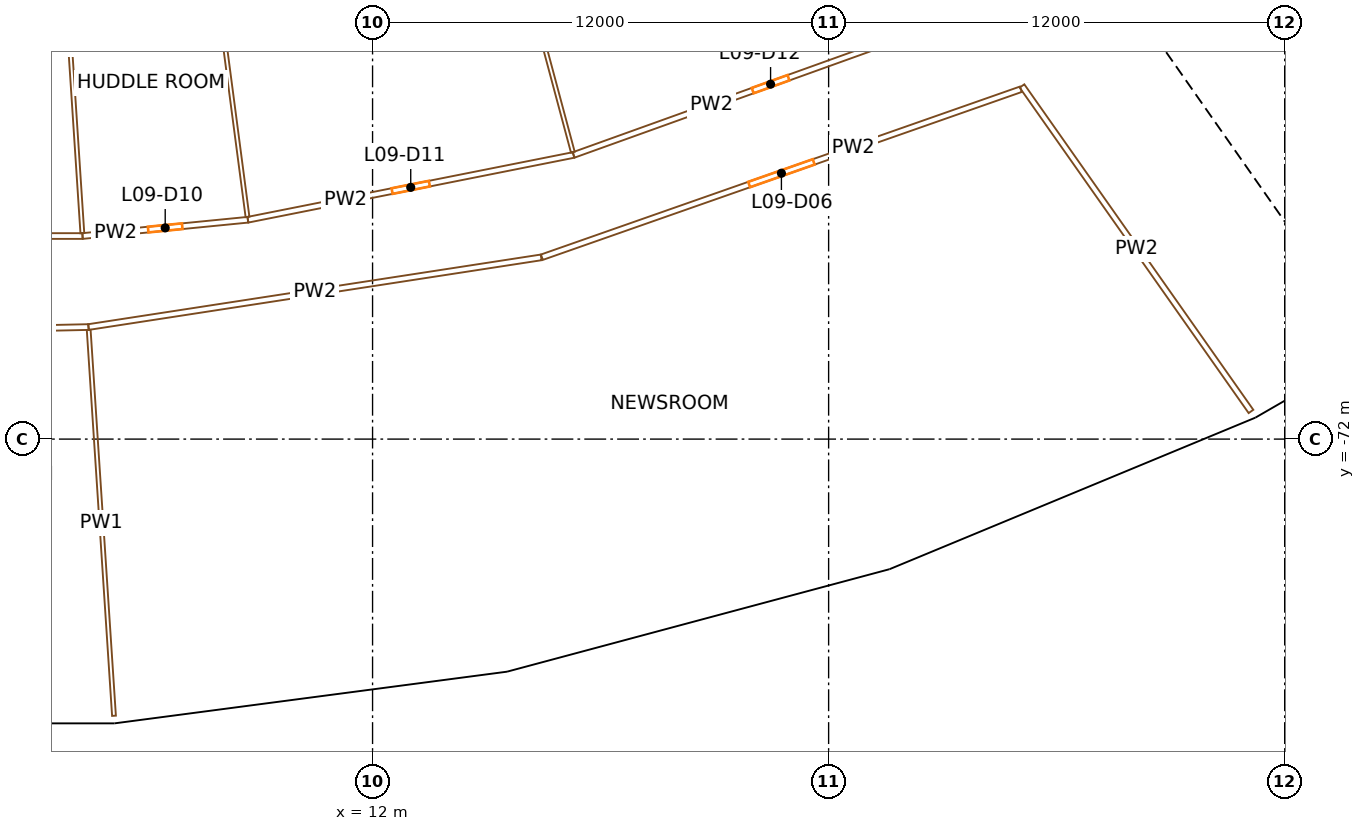
"""IFC4 building model, lengths in metres.
Left out: names, types, materials, properties, quantities, classifications, styles, units other than length and angle.
Written with IfcOpenShell. Run it as: python <this file> out.ifc"""

import sys

from ifc_helpers import new_model, si_unit, direction, frame, frame_2d, origin, origin_2d, place, context, subcontext, project, spatial, rectangle, extrude, element, fill, save


model = new_model("IFC4")
c1 = context("Model", 3, precision=1e-05, world=origin(), true_north=direction((0.0, 1.0)))
c2 = subcontext(c1, "Body", "Model", "MODEL_VIEW")
j1 = project(units=[si_unit("LENGTHUNIT", "METRE"), si_unit("PLANEANGLEUNIT", "RADIAN")], contexts=[c1])
p1 = place(None, origin())
s1 = spatial("IfcSite", under=j1, at=p1, CompositionType="ELEMENT")
p2 = place(p1, origin())
s2 = spatial("IfcBuilding", under=s1, at=p2, CompositionType="ELEMENT")
p3 = place(p2, frame((0.0, 0.0, 51.9)))
s3 = spatial("IfcBuildingStorey", under=s2, at=p3, CompositionType="ELEMENT", Elevation=51.9)
for number, where, z_axis, x_axis in (
    (1, (5.085, -77.583, 0.0), (0.0, 0.0, 1.0), (0.998, 0.065, 0.0)),
    (2, (15.168, -76.256, 0.0), (0.0, 0.0, 1.0), (0.981, 0.195, 0.0)),
    (3, (24.992, -73.624, 0.0), (0.0, 0.0, 1.0), (0.947, 0.321, 0.0)),
    (4, (34.388, -69.732, 0.0), (0.0, 0.0, 1.0), (0.897, 0.442, 0.0)),
):
    element("IfcColumn", number, at=place(p3, frame(where, z_axis=z_axis, x_axis=x_axis)), inside=s3, PredefinedType="COLUMN", context=c2, shape_type="SweptSolid", body=[
        extrude(rectangle(XDim=1.3, YDim=1.7, at=origin_2d()), origin(), (0.0, 0.0, 1.0), 3.8),
    ])
p4 = place(p3, frame((36.717, -66.337, 0.0), z_axis=(0.0, 0.0, 1.0), x_axis=(-0.573577477574, 0.819151315216, 0.0)))
e5 = element("IfcWall", 5, at=p4, inside=s3, PredefinedType="SHEAR", context=c2, shape_type="SweptSolid", body=[
    extrude(rectangle(XDim=14.8, YDim=0.9, at=frame_2d((7.4, 0.0))), origin(), (0.0, 0.0, 1.0), 3.5),
])
p5 = place(p4, frame((6.2, 0.0, 0.0)))
e6 = element("IfcOpeningElement", 6, at=p5, cuts=e5, PredefinedType="OPENING", context=c2, shape_type="SweptSolid", body=[
    extrude(rectangle(XDim=2.4, YDim=2.1, at=frame_2d((1.2, 1.05))), frame((0.0, 0.46, 0.0), z_axis=(0.0, -1.0, 0.0), x_axis=(1.0, 0.0, 0.0)), (0.0, 0.0, 1.0), 0.92),
])
p6 = place(p3, frame((35.221, -63.417, 0.0), z_axis=(0.0, 0.0, 1.0), x_axis=(0.819166993208, 0.573555086491, 0.0)))
e7 = element("IfcWall", 7, at=p6, inside=s3, PredefinedType="SOLIDWALL", context=c2, shape_type="SweptSolid", body=[
    extrude(rectangle(XDim=7.95, YDim=0.3, at=frame_2d((3.975, 0.0))), origin(), (0.0, 0.0, 1.0), 3.5),
])
p7 = place(p3, frame((35.798, -60.144, 0.0), z_axis=(0.0, 0.0, 1.0), x_axis=(0.573633636671, -0.819111989218, 0.0)))
e8 = element("IfcWall", 8, at=p7, inside=s3, PredefinedType="PARTITIONING", context=c2, shape_type="SweptSolid", body=[
    extrude(rectangle(XDim=2.2, YDim=0.15, at=frame_2d((1.1, 0.0))), origin(), (0.0, 0.0, 1.0), 3.5),
])
p8 = place(p3, frame((-4.369, -66.657, 0.0), z_axis=(0.0, 0.0, 1.0), x_axis=(1.0, 0.0, 0.0)))
e9 = element("IfcWall", 9, at=p8, inside=s3, PredefinedType="PARTITIONING", context=c2, shape_type="SweptSolid", body=[
    extrude(rectangle(XDim=8.738, YDim=0.15, at=frame_2d((4.369, 0.0))), origin(), (0.0, 0.0, 1.0), 2.4),
])
p9 = place(p8, frame((3.869, 0.0, 0.0)))
e10 = element("IfcOpeningElement", 10, at=p9, cuts=e9, PredefinedType="OPENING", context=c2, shape_type="SweptSolid", body=[
    extrude(rectangle(XDim=1.0, YDim=2.1, at=frame_2d((0.5, 1.05))), frame((0.0, 0.085, 0.0), z_axis=(0.0, -1.0, 0.0), x_axis=(1.0, 0.0, 0.0)), (0.0, 0.0, 1.0), 0.17),
])
p10 = place(p3, frame((4.526, -69.052, 0.0), z_axis=(0.0, 0.0, 1.0), x_axis=(-0.999761664283, -0.021831505468, 0.0)))
e11 = element("IfcWall", 11, at=p10, inside=s3, PredefinedType="PARTITIONING", context=c2, shape_type="SweptSolid", body=[
    extrude(rectangle(XDim=6.039, YDim=0.15, at=frame_2d((3.02, 0.0))), origin(), (0.0, 0.0, 1.0), 2.4),
])
p11 = place(p10, frame((2.52, 0.0, 0.0)))
e12 = element("IfcOpeningElement", 12, at=p11, cuts=e11, PredefinedType="OPENING", context=c2, shape_type="SweptSolid", body=[
    extrude(rectangle(XDim=1.0, YDim=2.1, at=frame_2d((0.5, 1.05))), frame((0.0, 0.085, 0.0), z_axis=(0.0, -1.0, 0.0), x_axis=(1.0, 0.0, 0.0)), (0.0, 0.0, 1.0), 0.17),
])
p12 = place(p3, frame((3.712, -56.628, 0.0), z_axis=(0.0, 0.0, 1.0), x_axis=(0.06539808502, -0.997859253841, 0.0)))
e13 = element("IfcWall", 13, at=p12, inside=s3, PredefinedType="PARTITIONING", context=c2, shape_type="SweptSolid", body=[
    extrude(rectangle(XDim=9.975, YDim=0.1, at=frame_2d((4.987, 0.0))), origin(), (0.0, 0.0, 1.0), 2.4),
])
p13 = place(p3, frame((4.369, -66.657, 0.0), z_axis=(0.0, 0.0, 1.0), x_axis=(0.995184826457, 0.098016127192, 0.0)))
e14 = element("IfcWall", 14, at=p13, inside=s3, PredefinedType="PARTITIONING", context=c2, shape_type="SweptSolid", body=[
    extrude(rectangle(XDim=4.371, YDim=0.15, at=frame_2d((2.186, 0.0))), origin(), (0.0, 0.0, 1.0), 2.4),
])
p14 = place(p13, frame((1.736, 0.0, 0.0)))
e15 = element("IfcOpeningElement", 15, at=p14, cuts=e14, PredefinedType="OPENING", context=c2, shape_type="SweptSolid", body=[
    extrude(rectangle(XDim=0.9, YDim=2.1, at=frame_2d((0.45, 1.05))), frame((0.0, 0.085, 0.0), z_axis=(0.0, -1.0, 0.0), x_axis=(1.0, 0.0, 0.0)), (0.0, 0.0, 1.0), 0.17),
])
p15 = place(p3, frame((4.526, -69.052, 0.0), z_axis=(0.0, 0.0, 1.0), x_axis=(0.988363732991, 0.152108945522, 0.0)))
e16 = element("IfcWall", 16, at=p15, inside=s3, PredefinedType="PARTITIONING", context=c2, shape_type="SweptSolid", body=[
    extrude(rectangle(XDim=12.051, YDim=0.15, at=frame_2d((6.025, 0.0))), origin(), (0.0, 0.0, 1.0), 2.4),
])
p16 = place(p3, frame((5.196, -79.28, 0.0), z_axis=(0.0, 0.0, 1.0), x_axis=(-0.065408959123, 0.99785854111, 0.0)))
e17 = element("IfcWall", 17, at=p16, inside=s3, PredefinedType="PARTITIONING", context=c2, shape_type="SweptSolid", body=[
    extrude(rectangle(XDim=10.175, YDim=0.1, at=frame_2d((5.087, 0.0))), origin(), (0.0, 0.0, 1.0), 2.4),
])
p17 = place(p3, frame((7.392, -56.145, 0.0), z_axis=(0.0, 0.0, 1.0), x_axis=(0.130538336764, -0.991443262439, 0.0)))
e18 = element("IfcWall", 18, at=p17, inside=s3, PredefinedType="PARTITIONING", context=c2, shape_type="SweptSolid", body=[
    extrude(rectangle(XDim=10.096, YDim=0.1, at=frame_2d((5.048, 0.0))), origin(), (0.0, 0.0, 1.0), 2.4),
])
p18 = place(p3, frame((8.719, -66.229, 0.0), z_axis=(0.0, 0.0, 1.0), x_axis=(0.980786466832, 0.195084357342, 0.0)))
e19 = element("IfcWall", 19, at=p18, inside=s3, PredefinedType="PARTITIONING", context=c2, shape_type="SweptSolid", body=[
    extrude(rectangle(XDim=8.738, YDim=0.15, at=frame_2d((4.369, 0.0))), origin(), (0.0, 0.0, 1.0), 2.4),
])
p19 = place(p18, frame((3.869, 0.0, 0.0)))
e20 = element("IfcOpeningElement", 20, at=p19, cuts=e19, PredefinedType="OPENING", context=c2, shape_type="SweptSolid", body=[
    extrude(rectangle(XDim=1.0, YDim=2.1, at=frame_2d((0.5, 1.05))), frame((0.0, 0.085, 0.0), z_axis=(0.0, -1.0, 0.0), x_axis=(1.0, 0.0, 0.0)), (0.0, 0.0, 1.0), 0.17),
])
p20 = place(p3, frame((14.657, -54.7, 0.0), z_axis=(0.0, 0.0, 1.0), x_axis=(0.258825935876, -0.965923979885, 0.0)))
e21 = element("IfcWall", 21, at=p20, inside=s3, PredefinedType="PARTITIONING", context=c2, shape_type="SweptSolid", body=[
    extrude(rectangle(XDim=10.096, YDim=0.1, at=frame_2d((5.048, 0.0))), origin(), (0.0, 0.0, 1.0), 2.4),
])
p21 = place(p3, frame((29.06, -62.794, 0.0), z_axis=(0.0, 0.0, 1.0), x_axis=(-0.943672989474, -0.330879568631, 0.0)))
e22 = element("IfcWall", 22, at=p21, inside=s3, PredefinedType="PARTITIONING", context=c2, shape_type="SweptSolid", body=[
    extrude(rectangle(XDim=13.357, YDim=0.15, at=frame_2d((6.679, 0.0))), origin(), (0.0, 0.0, 1.0), 2.4),
])
p22 = place(p21, frame((5.779, 0.0, 0.0)))
e23 = element("IfcOpeningElement", 23, at=p22, cuts=e22, PredefinedType="OPENING", context=c2, shape_type="SweptSolid", body=[
    extrude(rectangle(XDim=1.8, YDim=2.1, at=frame_2d((0.9, 1.05))), frame((0.0, 0.085, 0.0), z_axis=(0.0, -1.0, 0.0), x_axis=(1.0, 0.0, 0.0)), (0.0, 0.0, 1.0), 0.17),
])
p23 = place(p3, frame((17.289, -64.524, 0.0), z_axis=(0.0, 0.0, 1.0), x_axis=(0.941106453562, 0.338110400705, 0.0)))
e24 = element("IfcWall", 24, at=p23, inside=s3, PredefinedType="PARTITIONING", context=c2, shape_type="SweptSolid", body=[
    extrude(rectangle(XDim=11.016, YDim=0.15, at=frame_2d((5.508, 0.0))), origin(), (0.0, 0.0, 1.0), 2.4),
])
p24 = place(p23, frame((5.008, 0.0, 0.0)))
e25 = element("IfcOpeningElement", 25, at=p24, cuts=e24, PredefinedType="OPENING", context=c2, shape_type="SweptSolid", body=[
    extrude(rectangle(XDim=1.0, YDim=2.1, at=frame_2d((0.5, 1.05))), frame((0.0, 0.085, 0.0), z_axis=(0.0, -1.0, 0.0), x_axis=(1.0, 0.0, 0.0)), (0.0, 0.0, 1.0), 0.17),
])
p25 = place(p3, frame((29.088, -62.708, 0.0), z_axis=(0.0, 0.0, 1.0), x_axis=(0.575411972256, -0.817863718589, 0.0)))
e26 = element("IfcWall", 26, at=p25, inside=s3, PredefinedType="PARTITIONING", context=c2, shape_type="SweptSolid", body=[
    extrude(rectangle(XDim=10.471, YDim=0.15, at=frame_2d((5.236, 0.0))), origin(), (0.0, 0.0, 1.0), 2.4),
])
p26 = place(p22, origin())
e27 = element("IfcDoor", 27, at=p26, inside=s3, OperationType="DOUBLE_DOOR_SINGLE_SWING", PredefinedType="DOOR", context=c2, shape_type="SweptSolid", body=[
    extrude(rectangle(XDim=1.8, YDim=2.1, at=frame_2d((0.9, 1.05))), frame((0.0, 0.025, 0.0), z_axis=(0.0, -1.0, 0.0), x_axis=(1.0, 0.0, 0.0)), (0.0, 0.0, 1.0), 0.05),
])
fill(e23, e27)
p27 = place(p14, origin())
e28 = element("IfcDoor", 28, at=p27, inside=s3, OperationType="SINGLE_SWING_RIGHT", PredefinedType="DOOR", context=c2, shape_type="SweptSolid", body=[
    extrude(rectangle(XDim=0.9, YDim=2.1, at=frame_2d((0.45, 1.05))), frame((0.0, 0.025, 0.0), z_axis=(0.0, -1.0, 0.0), x_axis=(1.0, 0.0, 0.0)), (0.0, 0.0, 1.0), 0.05),
])
fill(e15, e28)
p28 = place(p19, origin())
e29 = element("IfcDoor", 29, at=p28, inside=s3, OperationType="SINGLE_SWING_RIGHT", PredefinedType="DOOR", context=c2, shape_type="SweptSolid", body=[
    extrude(rectangle(XDim=1.0, YDim=2.1, at=frame_2d((0.5, 1.05))), frame((0.0, 0.025, 0.0), z_axis=(0.0, -1.0, 0.0), x_axis=(1.0, 0.0, 0.0)), (0.0, 0.0, 1.0), 0.05),
])
fill(e20, e29)
p29 = place(p24, origin())
e30 = element("IfcDoor", 30, at=p29, inside=s3, OperationType="SINGLE_SWING_RIGHT", PredefinedType="DOOR", context=c2, shape_type="SweptSolid", body=[
    extrude(rectangle(XDim=1.0, YDim=2.1, at=frame_2d((0.5, 1.05))), frame((0.0, 0.025, 0.0), z_axis=(0.0, -1.0, 0.0), x_axis=(1.0, 0.0, 0.0)), (0.0, 0.0, 1.0), 0.05),
])
fill(e25, e30)
save(model, sys.argv[1])
